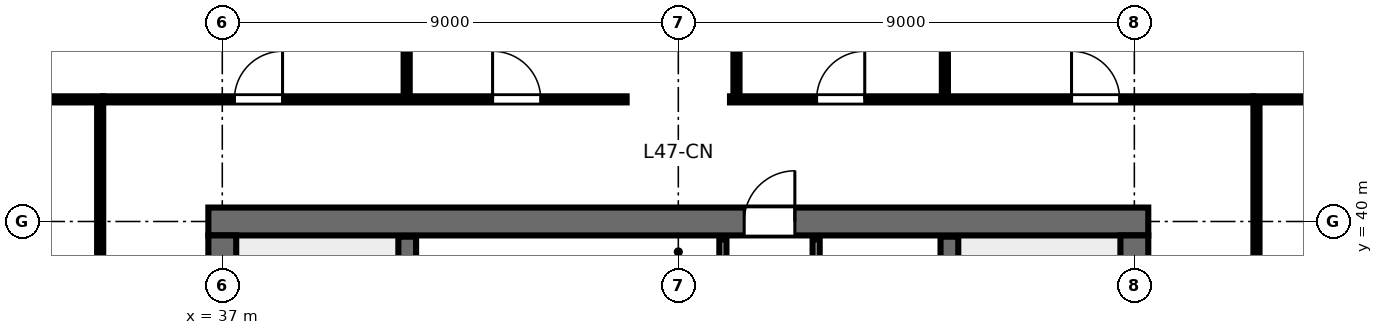
"""IFC4 building model, lengths in metres.
Left out: names, types, materials, properties, quantities, classifications, styles, units other than length and angle.
Written with IfcOpenShell. Run it as: python <this file> out.ifc"""

import sys

from ifc_helpers import new_model, si_unit, direction, frame, frame_2d, origin, place, context, subcontext, project, spatial, rectangle, extrude, element, fill, save


model = new_model("IFC4")
c1 = context("Model", 3, precision=1e-05, world=origin(), true_north=direction((0.0, 1.0)))
c2 = subcontext(c1, "Body", "Model", "MODEL_VIEW")
j1 = project(units=[si_unit("LENGTHUNIT", "METRE"), si_unit("PLANEANGLEUNIT", "RADIAN")], contexts=[c1])
p1 = place(None, origin())
s1 = spatial("IfcSite", under=j1, at=p1, CompositionType="ELEMENT")
p2 = place(p1, origin())
s2 = spatial("IfcBuilding", under=s1, at=p2, CompositionType="ELEMENT")
p3 = place(p2, frame((0.0, 0.0, 180.6)))
s3 = spatial("IfcBuildingStorey", under=s2, at=p3, CompositionType="ELEMENT", Elevation=180.6)
p4 = place(p3, frame((36.725, 40.0, 0.0), z_axis=(0.0, 0.0, 1.0), x_axis=(1.0, 0.0, 0.0)))
e1 = element("IfcWall", 1, at=p4, inside=s3, PredefinedType="SHEAR", context=c2, shape_type="SweptSolid", body=[
    extrude(rectangle(XDim=18.55, YDim=0.55, at=frame_2d((9.275, 0.0))), origin(), (0.0, 0.0, 1.0), 3.36),
])
p5 = place(p4, frame((10.575, 0.0, 0.0)))
e2 = element("IfcOpeningElement", 2, at=p5, cuts=e1, PredefinedType="OPENING", context=c2, shape_type="SweptSolid", body=[
    extrude(rectangle(XDim=1.0, YDim=2.15, at=frame_2d((0.5, 1.075))), frame((0.0, 0.285, 0.0), z_axis=(0.0, -1.0, 0.0), x_axis=(1.0, 0.0, 0.0)), (0.0, 0.0, 1.0), 0.57),
])
p6 = place(p3, frame((37.0, 24.275, 0.0), z_axis=(0.0, 0.0, 1.0), x_axis=(0.0, 1.0, 0.0)))
e3 = element("IfcWall", 3, at=p6, inside=s3, PredefinedType="SHEAR", context=c2, shape_type="SweptSolid", body=[
    extrude(rectangle(XDim=15.45, YDim=0.55, at=frame_2d((7.725, 0.0))), origin(), (0.0, 0.0, 1.0), 3.36),
])
p7 = place(p6, frame((5.25, 0.0, 0.0)))
e4 = element("IfcOpeningElement", 4, at=p7, cuts=e3, PredefinedType="OPENING", context=c2, shape_type="SweptSolid", body=[
    extrude(rectangle(XDim=1.15, YDim=2.15, at=frame_2d((0.575, 1.075))), frame((0.0, 0.285, 0.0), z_axis=(0.0, -1.0, 0.0), x_axis=(1.0, 0.0, 0.0)), (0.0, 0.0, 1.0), 0.57),
])
p8 = place(p3, frame((55.0, 24.275, 0.0), z_axis=(0.0, 0.0, 1.0), x_axis=(0.0, 1.0, 0.0)))
e5 = element("IfcWall", 5, at=p8, inside=s3, PredefinedType="SHEAR", context=c2, shape_type="SweptSolid", body=[
    extrude(rectangle(XDim=15.45, YDim=0.55, at=frame_2d((7.725, 0.0))), origin(), (0.0, 0.0, 1.0), 3.36),
])
p9 = place(p8, frame((5.25, 0.0, 0.0)))
e6 = element("IfcOpeningElement", 6, at=p9, cuts=e5, PredefinedType="OPENING", context=c2, shape_type="SweptSolid", body=[
    extrude(rectangle(XDim=1.15, YDim=2.15, at=frame_2d((0.575, 1.075))), frame((0.0, 0.285, 0.0), z_axis=(0.0, -1.0, 0.0), x_axis=(1.0, 0.0, 0.0)), (0.0, 0.0, 1.0), 0.57),
])
for number, where, z_axis, x_axis in (
    (7, (40.65, 32.0, 0.0), (0.0, 0.0, 1.0), (0.0, 1.0, 0.0)),
    (8, (51.35, 32.0, 0.0), (0.0, 0.0, 1.0), (0.0, 1.0, 0.0)),
):
    element("IfcWall", number, at=place(p3, frame(where, z_axis=z_axis, x_axis=x_axis)), inside=s3, PredefinedType="SHEAR", context=c2, shape_type="SweptSolid", body=[
        extrude(rectangle(XDim=7.7, YDim=0.35, at=frame_2d((3.85, 0.0))), origin(), (0.0, 0.0, 1.0), 3.6),
    ])
p10 = place(p3, frame((46.88, 32.05, 0.0), z_axis=(0.0, 0.0, 1.0), x_axis=(0.0, 1.0, 0.0)))
e9 = element("IfcWall", 9, at=p10, inside=s3, PredefinedType="PARTITIONING", context=c2, shape_type="SweptSolid", body=[
    extrude(rectangle(XDim=7.6, YDim=0.14, at=frame_2d((3.8, 0.0))), origin(), (0.0, 0.0, 1.0), 3.36),
])
p11 = place(p10, frame((3.4, 0.0, 0.0)))
e10 = element("IfcOpeningElement", 10, at=p11, cuts=e9, PredefinedType="OPENING", context=c2, shape_type="SweptSolid", body=[
    extrude(rectangle(XDim=0.95, YDim=2.15, at=frame_2d((0.475, 1.075))), frame((0.0, 0.08, 0.0), z_axis=(0.0, -1.0, 0.0), x_axis=(1.0, 0.0, 0.0)), (0.0, 0.0, 1.0), 0.16),
])
p12 = place(p3, frame((48.72, 32.05, 0.0), z_axis=(0.0, 0.0, 1.0), x_axis=(0.0, 1.0, 0.0)))
e11 = element("IfcWall", 11, at=p12, inside=s3, PredefinedType="PARTITIONING", context=c2, shape_type="SweptSolid", body=[
    extrude(rectangle(XDim=7.6, YDim=0.14, at=frame_2d((3.8, 0.0))), origin(), (0.0, 0.0, 1.0), 3.36),
])
p13 = place(p12, frame((0.8, 0.0, 0.0)))
e12 = element("IfcOpeningElement", 12, at=p13, cuts=e11, PredefinedType="OPENING", context=c2, shape_type="SweptSolid", body=[
    extrude(rectangle(XDim=0.9, YDim=2.15, at=frame_2d((0.45, 1.075))), frame((0.0, 0.08, 0.0), z_axis=(0.0, -1.0, 0.0), x_axis=(1.0, 0.0, 0.0)), (0.0, 0.0, 1.0), 0.16),
])
p14 = place(p12, frame((3.35, 0.0, 0.0)))
e13 = element("IfcOpeningElement", 13, at=p14, cuts=e11, PredefinedType="OPENING", context=c2, shape_type="SweptSolid", body=[
    extrude(rectangle(XDim=0.9, YDim=2.15, at=frame_2d((0.45, 1.075))), frame((0.0, 0.08, 0.0), z_axis=(0.0, -1.0, 0.0), x_axis=(1.0, 0.0, 0.0)), (0.0, 0.0, 1.0), 0.16),
])
p15 = place(p12, frame((5.9, 0.0, 0.0)))
e14 = element("IfcOpeningElement", 14, at=p15, cuts=e11, PredefinedType="OPENING", context=c2, shape_type="SweptSolid", body=[
    extrude(rectangle(XDim=0.92, YDim=2.15, at=frame_2d((0.46, 1.075))), frame((0.0, 0.08, 0.0), z_axis=(0.0, -1.0, 0.0), x_axis=(1.0, 0.0, 0.0)), (0.0, 0.0, 1.0), 0.16),
])
p16 = place(p3, frame((40.639, 42.41, 0.0), z_axis=(0.0, 0.0, 1.0), x_axis=(0.0, 1.0, 0.0)))
e15 = element("IfcWall", 15, at=p16, inside=s3, PredefinedType="PARTITIONING", context=c2, shape_type="SweptSolid", body=[
    extrude(rectangle(XDim=9.33, YDim=0.12, at=frame_2d((4.665, 0.0))), origin(), (0.0, 0.0, 1.0), 2.64),
])
p17 = place(p16, frame((1.4, 0.0, 0.0)))
e16 = element("IfcOpeningElement", 16, at=p17, cuts=e15, PredefinedType="OPENING", context=c2, shape_type="SweptSolid", body=[
    extrude(rectangle(XDim=0.9, YDim=2.15, at=frame_2d((0.45, 1.075))), frame((0.0, 0.07, 0.0), z_axis=(0.0, -1.0, 0.0), x_axis=(1.0, 0.0, 0.0)), (0.0, 0.0, 1.0), 0.14),
])
p18 = place(p3, frame((47.148, 42.41, 0.0), z_axis=(0.0, 0.0, 1.0), x_axis=(0.0, 1.0, 0.0)))
e17 = element("IfcWall", 17, at=p18, inside=s3, PredefinedType="PARTITIONING", context=c2, shape_type="SweptSolid", body=[
    extrude(rectangle(XDim=9.33, YDim=0.12, at=frame_2d((4.665, 0.0))), origin(), (0.0, 0.0, 1.0), 2.64),
])
p19 = place(p18, frame((1.4, 0.0, 0.0)))
e18 = element("IfcOpeningElement", 18, at=p19, cuts=e17, PredefinedType="OPENING", context=c2, shape_type="SweptSolid", body=[
    extrude(rectangle(XDim=0.9, YDim=2.15, at=frame_2d((0.45, 1.075))), frame((0.0, 0.07, 0.0), z_axis=(0.0, -1.0, 0.0), x_axis=(1.0, 0.0, 0.0)), (0.0, 0.0, 1.0), 0.14),
])
p20 = place(p3, frame((51.261, 42.41, 0.0), z_axis=(0.0, 0.0, 1.0), x_axis=(0.0, 1.0, 0.0)))
e19 = element("IfcWall", 19, at=p20, inside=s3, PredefinedType="PARTITIONING", context=c2, shape_type="SweptSolid", body=[
    extrude(rectangle(XDim=9.33, YDim=0.12, at=frame_2d((4.665, 0.0))), origin(), (0.0, 0.0, 1.0), 2.64),
])
p21 = place(p20, frame((1.4, 0.0, 0.0)))
e20 = element("IfcOpeningElement", 20, at=p21, cuts=e19, PredefinedType="OPENING", context=c2, shape_type="SweptSolid", body=[
    extrude(rectangle(XDim=0.9, YDim=2.15, at=frame_2d((0.45, 1.075))), frame((0.0, 0.07, 0.0), z_axis=(0.0, -1.0, 0.0), x_axis=(1.0, 0.0, 0.0)), (0.0, 0.0, 1.0), 0.14),
])
p22 = place(p3, frame((34.65, 42.41, 0.0), z_axis=(0.0, 0.0, 1.0), x_axis=(1.0, 0.0, 0.0)))
e21 = element("IfcWall", 21, at=p22, inside=s3, PredefinedType="PARTITIONING", context=c2, shape_type="SweptSolid", body=[
    extrude(rectangle(XDim=10.33, YDim=0.12, at=frame_2d((5.165, 0.0))), origin(), (0.0, 0.0, 1.0), 2.64),
])
p23 = place(p22, frame((2.59, 0.0, 0.0)))
e22 = element("IfcOpeningElement", 22, at=p23, cuts=e21, PredefinedType="OPENING", context=c2, shape_type="SweptSolid", body=[
    extrude(rectangle(XDim=0.95, YDim=2.15, at=frame_2d((0.475, 1.075))), frame((0.0, 0.07, 0.0), z_axis=(0.0, -1.0, 0.0), x_axis=(1.0, 0.0, 0.0)), (0.0, 0.0, 1.0), 0.14),
])
p24 = place(p22, frame((7.685, 0.0, 0.0)))
e23 = element("IfcOpeningElement", 23, at=p24, cuts=e21, PredefinedType="OPENING", context=c2, shape_type="SweptSolid", body=[
    extrude(rectangle(XDim=0.95, YDim=2.15, at=frame_2d((0.475, 1.075))), frame((0.0, 0.07, 0.0), z_axis=(0.0, -1.0, 0.0), x_axis=(1.0, 0.0, 0.0)), (0.0, 0.0, 1.0), 0.14),
])
p25 = place(p3, frame((47.02, 42.41, 0.0), z_axis=(0.0, 0.0, 1.0), x_axis=(1.0, 0.0, 0.0)))
e24 = element("IfcWall", 24, at=p25, inside=s3, PredefinedType="PARTITIONING", context=c2, shape_type="SweptSolid", body=[
    extrude(rectangle(XDim=10.33, YDim=0.12, at=frame_2d((5.165, 0.0))), origin(), (0.0, 0.0, 1.0), 2.64),
])
p26 = place(p25, frame((1.709, 0.0, 0.0)))
e25 = element("IfcOpeningElement", 25, at=p26, cuts=e24, PredefinedType="OPENING", context=c2, shape_type="SweptSolid", body=[
    extrude(rectangle(XDim=0.95, YDim=2.15, at=frame_2d((0.475, 1.075))), frame((0.0, 0.07, 0.0), z_axis=(0.0, -1.0, 0.0), x_axis=(1.0, 0.0, 0.0)), (0.0, 0.0, 1.0), 0.14),
])
p27 = place(p25, frame((6.74, 0.0, 0.0)))
e26 = element("IfcOpeningElement", 26, at=p27, cuts=e24, PredefinedType="OPENING", context=c2, shape_type="SweptSolid", body=[
    extrude(rectangle(XDim=0.95, YDim=2.15, at=frame_2d((0.475, 1.075))), frame((0.0, 0.07, 0.0), z_axis=(0.0, -1.0, 0.0), x_axis=(1.0, 0.0, 0.0)), (0.0, 0.0, 1.0), 0.14),
])
p28 = place(p3, frame((34.59, 21.65, 0.0), z_axis=(0.0, 0.0, 1.0), x_axis=(0.0, 1.0, 0.0)))
e27 = element("IfcWall", 27, at=p28, inside=s3, PredefinedType="PARTITIONING", context=c2, shape_type="SweptSolid", body=[
    extrude(rectangle(XDim=20.7, YDim=0.12, at=frame_2d((10.35, 0.0))), origin(), (0.0, 0.0, 1.0), 2.64),
])
p29 = place(p28, frame((9.875, 0.0, 0.0)))
e28 = element("IfcOpeningElement", 28, at=p29, cuts=e27, PredefinedType="OPENING", context=c2, shape_type="SweptSolid", body=[
    extrude(rectangle(XDim=0.95, YDim=2.15, at=frame_2d((0.475, 1.075))), frame((0.0, 0.07, 0.0), z_axis=(0.0, -1.0, 0.0), x_axis=(1.0, 0.0, 0.0)), (0.0, 0.0, 1.0), 0.14),
])
p30 = place(p3, frame((57.41, 21.65, 0.0), z_axis=(0.0, 0.0, 1.0), x_axis=(0.0, 1.0, 0.0)))
e29 = element("IfcWall", 29, at=p30, inside=s3, PredefinedType="PARTITIONING", context=c2, shape_type="SweptSolid", body=[
    extrude(rectangle(XDim=20.7, YDim=0.12, at=frame_2d((10.35, 0.0))), origin(), (0.0, 0.0, 1.0), 2.64),
])
p31 = place(p30, frame((6.073, 0.0, 0.0)))
e30 = element("IfcOpeningElement", 30, at=p31, cuts=e29, PredefinedType="OPENING", context=c2, shape_type="SweptSolid", body=[
    extrude(rectangle(XDim=0.95, YDim=2.15, at=frame_2d((0.475, 1.075))), frame((0.0, 0.07, 0.0), z_axis=(0.0, -1.0, 0.0), x_axis=(1.0, 0.0, 0.0)), (0.0, 0.0, 1.0), 0.14),
])
p32 = place(p30, frame((16.223, 0.0, 0.0)))
e31 = element("IfcOpeningElement", 31, at=p32, cuts=e29, PredefinedType="OPENING", context=c2, shape_type="SweptSolid", body=[
    extrude(rectangle(XDim=0.95, YDim=2.15, at=frame_2d((0.475, 1.075))), frame((0.0, 0.07, 0.0), z_axis=(0.0, -1.0, 0.0), x_axis=(1.0, 0.0, 0.0)), (0.0, 0.0, 1.0), 0.14),
])
for number, where, z_axis, x_axis in (
    (32, (34.65, 42.41, 0.0), (0.0, 0.0, 1.0), (-1.0, 0.0, 0.0)),
    (33, (57.35, 42.41, 0.0), (0.0, 0.0, 1.0), (1.0, 0.0, 0.0)),
):
    element("IfcWall", number, at=place(p3, frame(where, z_axis=z_axis, x_axis=x_axis)), inside=s3, PredefinedType="PARTITIONING", context=c2, shape_type="SweptSolid", body=[
        extrude(rectangle(XDim=11.03, YDim=0.12, at=frame_2d((5.515, 0.0))), origin(), (0.0, 0.0, 1.0), 2.64),
    ])
p33 = place(p5, origin())
e34 = element("IfcDoor", 34, at=p33, inside=s3, OperationType="SINGLE_SWING_RIGHT", PredefinedType="DOOR", context=c2, shape_type="SweptSolid", body=[
    extrude(rectangle(XDim=1.0, YDim=2.15, at=frame_2d((0.5, 1.075))), frame((0.0, 0.025, 0.0), z_axis=(0.0, -1.0, 0.0), x_axis=(1.0, 0.0, 0.0)), (0.0, 0.0, 1.0), 0.05),
])
fill(e2, e34)
p34 = place(p23, origin())
e35 = element("IfcDoor", 35, at=p34, inside=s3, OperationType="SINGLE_SWING_RIGHT", PredefinedType="DOOR", context=c2, shape_type="SweptSolid", body=[
    extrude(rectangle(XDim=0.95, YDim=2.15, at=frame_2d((0.475, 1.075))), frame((0.0, 0.025, 0.0), z_axis=(0.0, -1.0, 0.0), x_axis=(1.0, 0.0, 0.0)), (0.0, 0.0, 1.0), 0.05),
])
fill(e22, e35)
p35 = place(p24, origin())
e36 = element("IfcDoor", 36, at=p35, inside=s3, OperationType="SINGLE_SWING_LEFT", PredefinedType="DOOR", context=c2, shape_type="SweptSolid", body=[
    extrude(rectangle(XDim=0.95, YDim=2.15, at=frame_2d((0.475, 1.075))), frame((0.0, 0.025, 0.0), z_axis=(0.0, -1.0, 0.0), x_axis=(1.0, 0.0, 0.0)), (0.0, 0.0, 1.0), 0.05),
])
fill(e23, e36)
p36 = place(p26, origin())
e37 = element("IfcDoor", 37, at=p36, inside=s3, OperationType="SINGLE_SWING_RIGHT", PredefinedType="DOOR", context=c2, shape_type="SweptSolid", body=[
    extrude(rectangle(XDim=0.95, YDim=2.15, at=frame_2d((0.475, 1.075))), frame((0.0, 0.025, 0.0), z_axis=(0.0, -1.0, 0.0), x_axis=(1.0, 0.0, 0.0)), (0.0, 0.0, 1.0), 0.05),
])
fill(e25, e37)
p37 = place(p27, origin())
e38 = element("IfcDoor", 38, at=p37, inside=s3, OperationType="SINGLE_SWING_LEFT", PredefinedType="DOOR", context=c2, shape_type="SweptSolid", body=[
    extrude(rectangle(XDim=0.95, YDim=2.15, at=frame_2d((0.475, 1.075))), frame((0.0, 0.025, 0.0), z_axis=(0.0, -1.0, 0.0), x_axis=(1.0, 0.0, 0.0)), (0.0, 0.0, 1.0), 0.05),
])
fill(e26, e38)
save(model, sys.argv[1])
